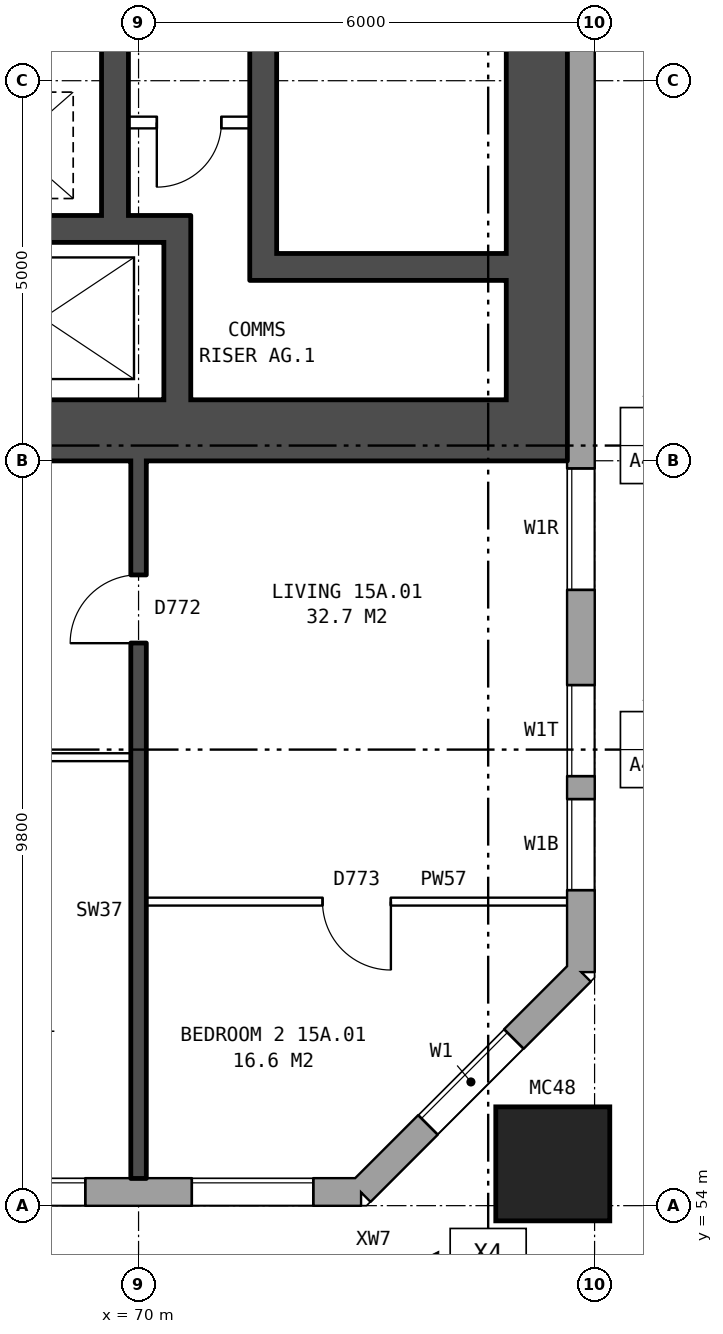
"""IFC4 building model, lengths in metres.
Left out: names, types, materials, properties, quantities, classifications, styles, units other than length and angle.
Written with IfcOpenShell. Run it as: python <this file> out.ifc"""

import sys

from ifc_helpers import new_model, si_unit, direction, frame, frame_2d, origin, origin_2d, place, context, subcontext, project, spatial, rectangle, hollow_rectangle, extrude, element, fill, save


model = new_model("IFC4")
c1 = context("Model", 3, precision=1e-05, world=origin(), true_north=direction((0.0, 1.0)))
c2 = subcontext(c1, "Body", "Model", "MODEL_VIEW")
j1 = project(units=[si_unit("LENGTHUNIT", "METRE"), si_unit("PLANEANGLEUNIT", "RADIAN")], contexts=[c1])
p1 = place(None, origin())
s1 = spatial("IfcSite", under=j1, at=p1, CompositionType="ELEMENT")
p2 = place(p1, origin())
s2 = spatial("IfcBuilding", under=s1, at=p2, CompositionType="ELEMENT")
p3 = place(p2, frame((0.0, 0.0, 56.7)))
s3 = spatial("IfcBuildingStorey", under=s2, at=p3, CompositionType="ELEMENT", Elevation=56.7)
p4 = place(p3, frame((75.45, 54.55, 0.0), z_axis=(0.0, 0.0, 1.0), x_axis=(1.0, 0.0, 0.0)))
e1 = element("IfcColumn", 1, at=p4, inside=s3, PredefinedType="COLUMN", context=c2, shape_type="SweptSolid", body=[
    extrude(hollow_rectangle(XDim=1.5, YDim=1.5, WallThickness=0.08, at=origin_2d()), origin(), (0.0, 0.0, 1.0), 3.1),
])
p5 = place(p3, frame((24.575, 54.18, 0.0), z_axis=(0.0, 0.0, 1.0), x_axis=(1.0, 0.0, 0.0)))
e2 = element("IfcWall", 2, at=p5, inside=s3, PredefinedType="STANDARD", context=c2, shape_type="SweptSolid", body=[
    extrude(rectangle(XDim=48.351, YDim=0.36, at=frame_2d((24.175, 0.0))), origin(), (0.0, 0.0, 1.0), 2.85),
])
p6 = place(p5, frame((1.125, 0.0, 0.8)))
e3 = element("IfcOpeningElement", 3, at=p6, cuts=e2, PredefinedType="OPENING", context=c2, shape_type="SweptSolid", body=[
    extrude(rectangle(XDim=1.6, YDim=1.8, at=frame_2d((0.8, 0.9))), frame((0.0, 0.19, 0.0), z_axis=(0.0, -1.0, 0.0), x_axis=(1.0, 0.0, 0.0)), (0.0, 0.0, 1.0), 0.38),
])
p7 = place(p5, frame((4.125, 0.0, 0.8)))
e4 = element("IfcOpeningElement", 4, at=p7, cuts=e2, PredefinedType="OPENING", context=c2, shape_type="SweptSolid", body=[
    extrude(rectangle(XDim=1.6, YDim=1.8, at=frame_2d((0.8, 0.9))), frame((0.0, 0.19, 0.0), z_axis=(0.0, -1.0, 0.0), x_axis=(1.0, 0.0, 0.0)), (0.0, 0.0, 1.0), 0.38),
])
p8 = place(p5, frame((7.125, 0.0, 0.8)))
e5 = element("IfcOpeningElement", 5, at=p8, cuts=e2, PredefinedType="OPENING", context=c2, shape_type="SweptSolid", body=[
    extrude(rectangle(XDim=1.6, YDim=1.8, at=frame_2d((0.8, 0.9))), frame((0.0, 0.19, 0.0), z_axis=(0.0, -1.0, 0.0), x_axis=(1.0, 0.0, 0.0)), (0.0, 0.0, 1.0), 0.38),
])
p9 = place(p5, frame((10.125, 0.0, 0.8)))
e6 = element("IfcOpeningElement", 6, at=p9, cuts=e2, PredefinedType="OPENING", context=c2, shape_type="SweptSolid", body=[
    extrude(rectangle(XDim=1.6, YDim=1.8, at=frame_2d((0.8, 0.9))), frame((0.0, 0.19, 0.0), z_axis=(0.0, -1.0, 0.0), x_axis=(1.0, 0.0, 0.0)), (0.0, 0.0, 1.0), 0.38),
])
p10 = place(p5, frame((13.125, 0.0, 0.8)))
e7 = element("IfcOpeningElement", 7, at=p10, cuts=e2, PredefinedType="OPENING", context=c2, shape_type="SweptSolid", body=[
    extrude(rectangle(XDim=1.6, YDim=1.8, at=frame_2d((0.8, 0.9))), frame((0.0, 0.19, 0.0), z_axis=(0.0, -1.0, 0.0), x_axis=(1.0, 0.0, 0.0)), (0.0, 0.0, 1.0), 0.38),
])
p11 = place(p5, frame((15.625, 0.0, 1.0)))
e8 = element("IfcOpeningElement", 8, at=p11, cuts=e2, PredefinedType="OPENING", context=c2, shape_type="SweptSolid", body=[
    extrude(rectangle(XDim=0.8, YDim=1.5, at=frame_2d((0.4, 0.75))), frame((0.0, 0.19, 0.0), z_axis=(0.0, -1.0, 0.0), x_axis=(1.0, 0.0, 0.0)), (0.0, 0.0, 1.0), 0.38),
])
p12 = place(p5, frame((16.725, 0.0, 1.6)))
e9 = element("IfcOpeningElement", 9, at=p12, cuts=e2, PredefinedType="OPENING", context=c2, shape_type="SweptSolid", body=[
    extrude(rectangle(XDim=0.6, YDim=0.9, at=frame_2d((0.3, 0.45))), frame((0.0, 0.19, 0.0), z_axis=(0.0, -1.0, 0.0), x_axis=(1.0, 0.0, 0.0)), (0.0, 0.0, 1.0), 0.38),
])
p13 = place(p5, frame((22.125, 0.0, 0.8)))
e10 = element("IfcOpeningElement", 10, at=p13, cuts=e2, PredefinedType="OPENING", context=c2, shape_type="SweptSolid", body=[
    extrude(rectangle(XDim=1.6, YDim=1.8, at=frame_2d((0.8, 0.9))), frame((0.0, 0.19, 0.0), z_axis=(0.0, -1.0, 0.0), x_axis=(1.0, 0.0, 0.0)), (0.0, 0.0, 1.0), 0.38),
])
p14 = place(p5, frame((25.125, 0.0, 0.8)))
e11 = element("IfcOpeningElement", 11, at=p14, cuts=e2, PredefinedType="OPENING", context=c2, shape_type="SweptSolid", body=[
    extrude(rectangle(XDim=1.6, YDim=1.8, at=frame_2d((0.8, 0.9))), frame((0.0, 0.19, 0.0), z_axis=(0.0, -1.0, 0.0), x_axis=(1.0, 0.0, 0.0)), (0.0, 0.0, 1.0), 0.38),
])
p15 = place(p5, frame((27.625, 0.0, 0.35)))
e12 = element("IfcOpeningElement", 12, at=p15, cuts=e2, PredefinedType="OPENING", context=c2, shape_type="SweptSolid", body=[
    extrude(rectangle(XDim=1.2, YDim=1.8, at=frame_2d((0.6, 0.9))), frame((0.0, 0.19, 0.0), z_axis=(0.0, -1.0, 0.0), x_axis=(1.0, 0.0, 0.0)), (0.0, 0.0, 1.0), 0.38),
])
p16 = place(p5, frame((30.875, 0.0, 1.7)))
e13 = element("IfcOpeningElement", 13, at=p16, cuts=e2, PredefinedType="OPENING", context=c2, shape_type="SweptSolid", body=[
    extrude(rectangle(XDim=1.0, YDim=0.9, at=frame_2d((0.5, 0.45))), frame((0.0, 0.19, 0.0), z_axis=(0.0, -1.0, 0.0), x_axis=(1.0, 0.0, 0.0)), (0.0, 0.0, 1.0), 0.38),
])
p17 = place(p5, frame((34.125, 0.0, 0.8)))
e14 = element("IfcOpeningElement", 14, at=p17, cuts=e2, PredefinedType="OPENING", context=c2, shape_type="SweptSolid", body=[
    extrude(rectangle(XDim=1.6, YDim=1.8, at=frame_2d((0.8, 0.9))), frame((0.0, 0.19, 0.0), z_axis=(0.0, -1.0, 0.0), x_axis=(1.0, 0.0, 0.0)), (0.0, 0.0, 1.0), 0.38),
])
p18 = place(p5, frame((37.125, 0.0, 0.8)))
e15 = element("IfcOpeningElement", 15, at=p18, cuts=e2, PredefinedType="OPENING", context=c2, shape_type="SweptSolid", body=[
    extrude(rectangle(XDim=1.6, YDim=1.8, at=frame_2d((0.8, 0.9))), frame((0.0, 0.19, 0.0), z_axis=(0.0, -1.0, 0.0), x_axis=(1.0, 0.0, 0.0)), (0.0, 0.0, 1.0), 0.38),
])
p19 = place(p5, frame((40.125, 0.0, 0.8)))
e16 = element("IfcOpeningElement", 16, at=p19, cuts=e2, PredefinedType="OPENING", context=c2, shape_type="SweptSolid", body=[
    extrude(rectangle(XDim=1.6, YDim=1.8, at=frame_2d((0.8, 0.9))), frame((0.0, 0.19, 0.0), z_axis=(0.0, -1.0, 0.0), x_axis=(1.0, 0.0, 0.0)), (0.0, 0.0, 1.0), 0.38),
])
p20 = place(p5, frame((43.125, 0.0, 0.8)))
e17 = element("IfcOpeningElement", 17, at=p20, cuts=e2, PredefinedType="OPENING", context=c2, shape_type="SweptSolid", body=[
    extrude(rectangle(XDim=1.6, YDim=1.8, at=frame_2d((0.8, 0.9))), frame((0.0, 0.19, 0.0), z_axis=(0.0, -1.0, 0.0), x_axis=(1.0, 0.0, 0.0)), (0.0, 0.0, 1.0), 0.38),
])
p21 = place(p5, frame((46.125, 0.0, 0.8)))
e18 = element("IfcOpeningElement", 18, at=p21, cuts=e2, PredefinedType="OPENING", context=c2, shape_type="SweptSolid", body=[
    extrude(rectangle(XDim=1.6, YDim=1.8, at=frame_2d((0.8, 0.9))), frame((0.0, 0.19, 0.0), z_axis=(0.0, -1.0, 0.0), x_axis=(1.0, 0.0, 0.0)), (0.0, 0.0, 1.0), 0.38),
])
p22 = place(p5, frame((18.875, 0.0, 0.8)))
e19 = element("IfcOpeningElement", 19, at=p22, cuts=e2, PredefinedType="OPENING", context=c2, shape_type="SweptSolid", body=[
    extrude(rectangle(XDim=1.0, YDim=0.9, at=frame_2d((0.5, 0.45))), frame((0.0, 0.19, 0.0), z_axis=(0.0, -1.0, 0.0), x_axis=(1.0, 0.0, 0.0)), (0.0, 0.0, 1.0), 0.38),
])
p23 = place(p5, frame((20.175, 0.0, 0.8)))
e20 = element("IfcOpeningElement", 20, at=p23, cuts=e2, PredefinedType="OPENING", context=c2, shape_type="SweptSolid", body=[
    extrude(rectangle(XDim=1.0, YDim=1.8, at=frame_2d((0.5, 0.9))), frame((0.0, 0.19, 0.0), z_axis=(0.0, -1.0, 0.0), x_axis=(1.0, 0.0, 0.0)), (0.0, 0.0, 1.0), 0.38),
])
p24 = place(p5, frame((29.125, 0.0, 0.35)))
e21 = element("IfcOpeningElement", 21, at=p24, cuts=e2, PredefinedType="OPENING", context=c2, shape_type="SweptSolid", body=[
    extrude(rectangle(XDim=1.0, YDim=0.9, at=frame_2d((0.5, 0.45))), frame((0.0, 0.19, 0.0), z_axis=(0.0, -1.0, 0.0), x_axis=(1.0, 0.0, 0.0)), (0.0, 0.0, 1.0), 0.38),
])
p25 = place(p5, frame((32.225, 0.0, 0.8)))
e22 = element("IfcOpeningElement", 22, at=p25, cuts=e2, PredefinedType="OPENING", context=c2, shape_type="SweptSolid", body=[
    extrude(rectangle(XDim=1.0, YDim=1.8, at=frame_2d((0.5, 0.9))), frame((0.0, 0.19, 0.0), z_axis=(0.0, -1.0, 0.0), x_axis=(1.0, 0.0, 0.0)), (0.0, 0.0, 1.0), 0.38),
])
p26 = place(p3, frame((72.925, 54.18, 0.0), z_axis=(0.0, 0.0, 1.0), x_axis=(0.707106781187, 0.707106781187, 0.0)))
e23 = element("IfcWall", 23, at=p26, inside=s3, PredefinedType="STANDARD", context=c2, shape_type="SweptSolid", body=[
    extrude(rectangle(XDim=4.094, YDim=0.36, at=frame_2d((2.047, 0.0))), origin(), (0.0, 0.0, 1.0), 2.85),
])
p27 = place(p26, frame((1.247, 0.0, 0.8)))
e24 = element("IfcOpeningElement", 24, at=p27, cuts=e23, PredefinedType="OPENING", context=c2, shape_type="SweptSolid", body=[
    extrude(rectangle(XDim=1.6, YDim=1.8, at=frame_2d((0.8, 0.9))), frame((0.0, 0.19, 0.0), z_axis=(0.0, -1.0, 0.0), x_axis=(1.0, 0.0, 0.0)), (0.0, 0.0, 1.0), 0.38),
])
p28 = place(p3, frame((75.82, 57.075, 0.0), z_axis=(0.0, 0.0, 1.0), x_axis=(0.0, 1.0, 0.0)))
e25 = element("IfcWall", 25, at=p28, inside=s3, PredefinedType="STANDARD", context=c2, shape_type="SweptSolid", body=[
    extrude(rectangle(XDim=25.851, YDim=0.36, at=frame_2d((12.925, 0.0))), origin(), (0.0, 0.0, 1.0), 2.85),
])
p29 = place(p28, frame((1.075, 0.0, 0.8)))
e26 = element("IfcOpeningElement", 26, at=p29, cuts=e25, PredefinedType="OPENING", context=c2, shape_type="SweptSolid", body=[
    extrude(rectangle(XDim=1.2, YDim=1.8, at=frame_2d((0.6, 0.9))), frame((0.0, 0.19, 0.0), z_axis=(0.0, -1.0, 0.0), x_axis=(1.0, 0.0, 0.0)), (0.0, 0.0, 1.0), 0.38),
])
p30 = place(p28, frame((2.575, 0.0, 0.8)))
e27 = element("IfcOpeningElement", 27, at=p30, cuts=e25, PredefinedType="OPENING", context=c2, shape_type="SweptSolid", body=[
    extrude(rectangle(XDim=1.2, YDim=0.9, at=frame_2d((0.6, 0.45))), frame((0.0, 0.19, 0.0), z_axis=(0.0, -1.0, 0.0), x_axis=(1.0, 0.0, 0.0)), (0.0, 0.0, 1.0), 0.38),
])
p31 = place(p28, frame((19.225, 0.0, 1.7)))
e28 = element("IfcOpeningElement", 28, at=p31, cuts=e25, PredefinedType="OPENING", context=c2, shape_type="SweptSolid", body=[
    extrude(rectangle(XDim=1.6, YDim=0.9, at=frame_2d((0.8, 0.45))), frame((0.0, 0.19, 0.0), z_axis=(0.0, -1.0, 0.0), x_axis=(1.0, 0.0, 0.0)), (0.0, 0.0, 1.0), 0.38),
])
p32 = place(p28, frame((22.025, 0.0, 0.8)))
e29 = element("IfcOpeningElement", 29, at=p32, cuts=e25, PredefinedType="OPENING", context=c2, shape_type="SweptSolid", body=[
    extrude(rectangle(XDim=1.2, YDim=0.9, at=frame_2d((0.6, 0.45))), frame((0.0, 0.19, 0.0), z_axis=(0.0, -1.0, 0.0), x_axis=(1.0, 0.0, 0.0)), (0.0, 0.0, 1.0), 0.38),
])
p33 = place(p28, frame((5.025, 0.0, 1.7)))
e30 = element("IfcOpeningElement", 30, at=p33, cuts=e25, PredefinedType="OPENING", context=c2, shape_type="SweptSolid", body=[
    extrude(rectangle(XDim=1.6, YDim=0.9, at=frame_2d((0.8, 0.45))), frame((0.0, 0.19, 0.0), z_axis=(0.0, -1.0, 0.0), x_axis=(1.0, 0.0, 0.0)), (0.0, 0.0, 1.0), 0.38),
])
p34 = place(p28, frame((23.525, 0.0, 0.8)))
e31 = element("IfcOpeningElement", 31, at=p34, cuts=e25, PredefinedType="OPENING", context=c2, shape_type="SweptSolid", body=[
    extrude(rectangle(XDim=1.2, YDim=1.8, at=frame_2d((0.6, 0.9))), frame((0.0, 0.19, 0.0), z_axis=(0.0, -1.0, 0.0), x_axis=(1.0, 0.0, 0.0)), (0.0, 0.0, 1.0), 0.38),
])
p35 = place(p3, frame((75.24, 64.6, 0.0), z_axis=(0.0, 0.0, 1.0), x_axis=(0.0, 1.0, 0.0)))
e32 = element("IfcWall", 32, at=p35, inside=s3, PredefinedType="SHEAR", context=c2, shape_type="SweptSolid", body=[
    extrude(rectangle(XDim=10.8, YDim=0.8, at=frame_2d((5.4, 0.0))), origin(), (0.0, 0.0, 1.0), 2.85),
])
p36 = place(p3, frame((66.64, 64.2, 0.0), z_axis=(0.0, 0.0, 1.0), x_axis=(1.0, 0.0, 0.0)))
e33 = element("IfcWall", 33, at=p36, inside=s3, PredefinedType="SHEAR", context=c2, shape_type="SweptSolid", body=[
    extrude(rectangle(XDim=9.0, YDim=0.8, at=frame_2d((4.5, 0.0))), origin(), (0.0, 0.0, 1.0), 2.85),
])
p37 = place(p3, frame((71.815, 66.35, 0.0), z_axis=(0.0, 0.0, 1.0), x_axis=(1.0, 0.0, 0.0)))
e34 = element("IfcWall", 34, at=p37, inside=s3, PredefinedType="SHEAR", context=c2, shape_type="SweptSolid", body=[
    extrude(rectangle(XDim=3.025, YDim=0.35, at=frame_2d((1.513, 0.0))), origin(), (0.0, 0.0, 1.0), 2.85),
])
p38 = place(p3, frame((67.44, 66.85, 0.0), z_axis=(0.0, 0.0, 1.0), x_axis=(1.0, 0.0, 0.0)))
e35 = element("IfcWall", 35, at=p38, inside=s3, PredefinedType="SHEAR", context=c2, shape_type="SweptSolid", body=[
    extrude(rectangle(XDim=3.245, YDim=0.35, at=frame_2d((1.623, 0.0))), origin(), (0.0, 0.0, 1.0), 2.85),
])
p39 = place(p3, frame((69.865, 68.25, 0.0), z_axis=(0.0, 0.0, 1.0), x_axis=(1.0, 0.0, 0.0)))
e36 = element("IfcWall", 36, at=p39, inside=s3, PredefinedType="PARTITIONING", context=c2, shape_type="SweptSolid", body=[
    extrude(rectangle(XDim=1.6, YDim=0.15, at=frame_2d((0.8, 0.0))), origin(), (0.0, 0.0, 1.0), 2.85),
])
p40 = place(p39, frame((0.375, 0.0, 0.0)))
e37 = element("IfcOpeningElement", 37, at=p40, cuts=e36, PredefinedType="OPENING", context=c2, shape_type="SweptSolid", body=[
    extrude(rectangle(XDim=0.85, YDim=2.1, at=frame_2d((0.425, 1.05))), frame((0.0, 0.085, 0.0), z_axis=(0.0, -1.0, 0.0), x_axis=(1.0, 0.0, 0.0)), (0.0, 0.0, 1.0), 0.17),
])
p41 = place(p3, frame((69.69, 67.025, 0.0), z_axis=(0.0, 0.0, 1.0), x_axis=(0.0, 1.0, 0.0)))
e38 = element("IfcWall", 38, at=p41, inside=s3, PredefinedType="SHEAR", context=c2, shape_type="SweptSolid", body=[
    extrude(rectangle(XDim=6.6, YDim=0.35, at=frame_2d((3.3, 0.0))), origin(), (0.0, 0.0, 1.0), 2.85),
])
p42 = place(p3, frame((70.51, 64.6, 0.0), z_axis=(0.0, 0.0, 1.0), x_axis=(0.0, 1.0, 0.0)))
e39 = element("IfcWall", 39, at=p42, inside=s3, PredefinedType="SHEAR", context=c2, shape_type="SweptSolid", body=[
    extrude(rectangle(XDim=2.075, YDim=0.35, at=frame_2d((1.038, 0.0))), origin(), (0.0, 0.0, 1.0), 2.85),
])
p43 = place(p3, frame((71.64, 66.175, 0.0), z_axis=(0.0, 0.0, 1.0), x_axis=(0.0, 1.0, 0.0)))
e40 = element("IfcWall", 40, at=p43, inside=s3, PredefinedType="SHEAR", context=c2, shape_type="SweptSolid", body=[
    extrude(rectangle(XDim=7.275, YDim=0.35, at=frame_2d((3.637, 0.0))), origin(), (0.0, 0.0, 1.0), 2.85),
])
p44 = place(p43, frame((5.8, 0.0, 0.0)))
e41 = element("IfcOpeningElement", 41, at=p44, cuts=e40, PredefinedType="OPENING", context=c2, shape_type="SweptSolid", body=[
    extrude(rectangle(XDim=1.1, YDim=2.1, at=frame_2d((0.55, 1.05))), frame((0.0, 0.185, 0.0), z_axis=(0.0, -1.0, 0.0), x_axis=(1.0, 0.0, 0.0)), (0.0, 0.0, 1.0), 0.37),
])
p45 = place(p3, frame((70.1, 58.0, 0.0), z_axis=(0.0, 0.0, 1.0), x_axis=(1.0, 0.0, 0.0)))
e42 = element("IfcWall", 42, at=p45, inside=s3, PredefinedType="PARTITIONING", context=c2, shape_type="SweptSolid", body=[
    extrude(rectangle(XDim=5.54, YDim=0.1, at=frame_2d((2.77, 0.0))), origin(), (0.0, 0.0, 1.0), 2.85),
])
p46 = place(p45, frame((2.32, 0.0, 0.0)))
e43 = element("IfcOpeningElement", 43, at=p46, cuts=e42, PredefinedType="OPENING", context=c2, shape_type="SweptSolid", body=[
    extrude(rectangle(XDim=0.9, YDim=2.1, at=frame_2d((0.45, 1.05))), frame((0.0, 0.06, 0.0), z_axis=(0.0, -1.0, 0.0), x_axis=(1.0, 0.0, 0.0)), (0.0, 0.0, 1.0), 0.12),
])
p47 = place(p3, frame((64.1, 59.9, 0.0), z_axis=(0.0, 0.0, 1.0), x_axis=(1.0, 0.0, 0.0)))
e44 = element("IfcWall", 44, at=p47, inside=s3, PredefinedType="PARTITIONING", context=c2, shape_type="SweptSolid", body=[
    extrude(rectangle(XDim=5.8, YDim=0.1, at=frame_2d((2.9, 0.0))), origin(), (0.0, 0.0, 1.0), 2.85),
])
p48 = place(p47, frame((3.6, 0.0, 0.0)))
e45 = element("IfcOpeningElement", 45, at=p48, cuts=e44, PredefinedType="OPENING", context=c2, shape_type="SweptSolid", body=[
    extrude(rectangle(XDim=0.9, YDim=2.1, at=frame_2d((0.45, 1.05))), frame((0.0, 0.06, 0.0), z_axis=(0.0, -1.0, 0.0), x_axis=(1.0, 0.0, 0.0)), (0.0, 0.0, 1.0), 0.12),
])
p49 = place(p47, frame((0.7, 0.0, 0.0)))
e46 = element("IfcOpeningElement", 46, at=p49, cuts=e44, PredefinedType="OPENING", context=c2, shape_type="SweptSolid", body=[
    extrude(rectangle(XDim=0.9, YDim=2.1, at=frame_2d((0.45, 1.05))), frame((0.0, 0.06, 0.0), z_axis=(0.0, -1.0, 0.0), x_axis=(1.0, 0.0, 0.0)), (0.0, 0.0, 1.0), 0.12),
])
p50 = place(p3, frame((70.0, 54.36, 0.0), z_axis=(0.0, 0.0, 1.0), x_axis=(0.0, 1.0, 0.0)))
e47 = element("IfcWall", 47, at=p50, inside=s3, PredefinedType="SOLIDWALL", context=c2, shape_type="SweptSolid", body=[
    extrude(rectangle(XDim=9.44, YDim=0.2, at=frame_2d((4.72, 0.0))), origin(), (0.0, 0.0, 1.0), 2.85),
])
p51 = place(p50, frame((7.04, 0.0, 0.0)))
e48 = element("IfcOpeningElement", 48, at=p51, cuts=e47, PredefinedType="OPENING", context=c2, shape_type="SweptSolid", body=[
    extrude(rectangle(XDim=0.9, YDim=2.1, at=frame_2d((0.45, 1.05))), frame((0.0, 0.11, 0.0), z_axis=(0.0, -1.0, 0.0), x_axis=(1.0, 0.0, 0.0)), (0.0, 0.0, 1.0), 0.22),
])
p52 = place(p20, origin())
e49 = element("IfcWindow", 49, at=p52, inside=s3, PartitioningType="SINGLE_PANEL", PredefinedType="WINDOW", context=c2, shape_type="SweptSolid", body=[
    extrude(rectangle(XDim=1.6, YDim=1.8, at=frame_2d((0.8, 0.9))), frame((0.0, 0.15, 0.0), z_axis=(0.0, -1.0, 0.0), x_axis=(1.0, 0.0, 0.0)), (0.0, 0.0, 1.0), 0.06),
])
fill(e17, e49)
p53 = place(p21, origin())
e50 = element("IfcWindow", 50, at=p53, inside=s3, PartitioningType="SINGLE_PANEL", PredefinedType="WINDOW", context=c2, shape_type="SweptSolid", body=[
    extrude(rectangle(XDim=1.6, YDim=1.8, at=frame_2d((0.8, 0.9))), frame((0.0, 0.15, 0.0), z_axis=(0.0, -1.0, 0.0), x_axis=(1.0, 0.0, 0.0)), (0.0, 0.0, 1.0), 0.06),
])
fill(e18, e50)
p54 = place(p27, origin())
e51 = element("IfcWindow", 51, at=p54, inside=s3, PartitioningType="SINGLE_PANEL", PredefinedType="WINDOW", context=c2, shape_type="SweptSolid", body=[
    extrude(rectangle(XDim=1.6, YDim=1.8, at=frame_2d((0.8, 0.9))), frame((0.0, 0.15, 0.0), z_axis=(0.0, -1.0, 0.0), x_axis=(1.0, 0.0, 0.0)), (0.0, 0.0, 1.0), 0.06),
])
fill(e24, e51)
p55 = place(p29, origin())
e52 = element("IfcWindow", 52, at=p55, inside=s3, PartitioningType="SINGLE_PANEL", PredefinedType="WINDOW", context=c2, shape_type="SweptSolid", body=[
    extrude(rectangle(XDim=1.2, YDim=1.8, at=frame_2d((0.6, 0.9))), frame((0.0, 0.15, 0.0), z_axis=(0.0, -1.0, 0.0), x_axis=(1.0, 0.0, 0.0)), (0.0, 0.0, 1.0), 0.06),
])
fill(e26, e52)
p56 = place(p30, origin())
e53 = element("IfcWindow", 53, at=p56, inside=s3, PartitioningType="SINGLE_PANEL", PredefinedType="WINDOW", context=c2, shape_type="SweptSolid", body=[
    extrude(rectangle(XDim=1.2, YDim=0.9, at=frame_2d((0.6, 0.45))), frame((0.0, 0.15, 0.0), z_axis=(0.0, -1.0, 0.0), x_axis=(1.0, 0.0, 0.0)), (0.0, 0.0, 1.0), 0.06),
])
fill(e27, e53)
p57 = place(p40, frame((0.85, 0.0, 0.0), z_axis=(0.0, 0.0, 1.0), x_axis=(-1.0, 0.0, 0.0)))
e54 = element("IfcDoor", 54, at=p57, inside=s3, OperationType="SINGLE_SWING_RIGHT", PredefinedType="DOOR", context=c2, shape_type="SweptSolid", body=[
    extrude(rectangle(XDim=0.85, YDim=2.1, at=frame_2d((0.425, 1.05))), frame((0.0, 0.025, 0.0), z_axis=(0.0, -1.0, 0.0), x_axis=(1.0, 0.0, 0.0)), (0.0, 0.0, 1.0), 0.05),
])
fill(e37, e54)
p58 = place(p46, frame((0.9, 0.0, 0.0), z_axis=(0.0, 0.0, 1.0), x_axis=(-1.0, 0.0, 0.0)))
e55 = element("IfcDoor", 55, at=p58, inside=s3, OperationType="SINGLE_SWING_LEFT", PredefinedType="DOOR", context=c2, shape_type="SweptSolid", body=[
    extrude(rectangle(XDim=0.9, YDim=2.1, at=frame_2d((0.45, 1.05))), frame((0.0, 0.025, 0.0), z_axis=(0.0, -1.0, 0.0), x_axis=(1.0, 0.0, 0.0)), (0.0, 0.0, 1.0), 0.05),
])
fill(e43, e55)
p59 = place(p51, origin())
e56 = element("IfcDoor", 56, at=p59, inside=s3, OperationType="SINGLE_SWING_LEFT", PredefinedType="DOOR", context=c2, shape_type="SweptSolid", body=[
    extrude(rectangle(XDim=0.9, YDim=2.1, at=frame_2d((0.45, 1.05))), frame((0.0, 0.025, 0.0), z_axis=(0.0, -1.0, 0.0), x_axis=(1.0, 0.0, 0.0)), (0.0, 0.0, 1.0), 0.05),
])
fill(e48, e56)
p60 = place(p33, origin())
e57 = element("IfcWindow", 57, at=p60, inside=s3, PartitioningType="SINGLE_PANEL", PredefinedType="WINDOW", context=c2, shape_type="SweptSolid", body=[
    extrude(rectangle(XDim=1.6, YDim=0.9, at=frame_2d((0.8, 0.45))), frame((0.0, 0.15, 0.0), z_axis=(0.0, -1.0, 0.0), x_axis=(1.0, 0.0, 0.0)), (0.0, 0.0, 1.0), 0.06),
])
fill(e30, e57)
save(model, sys.argv[1])
